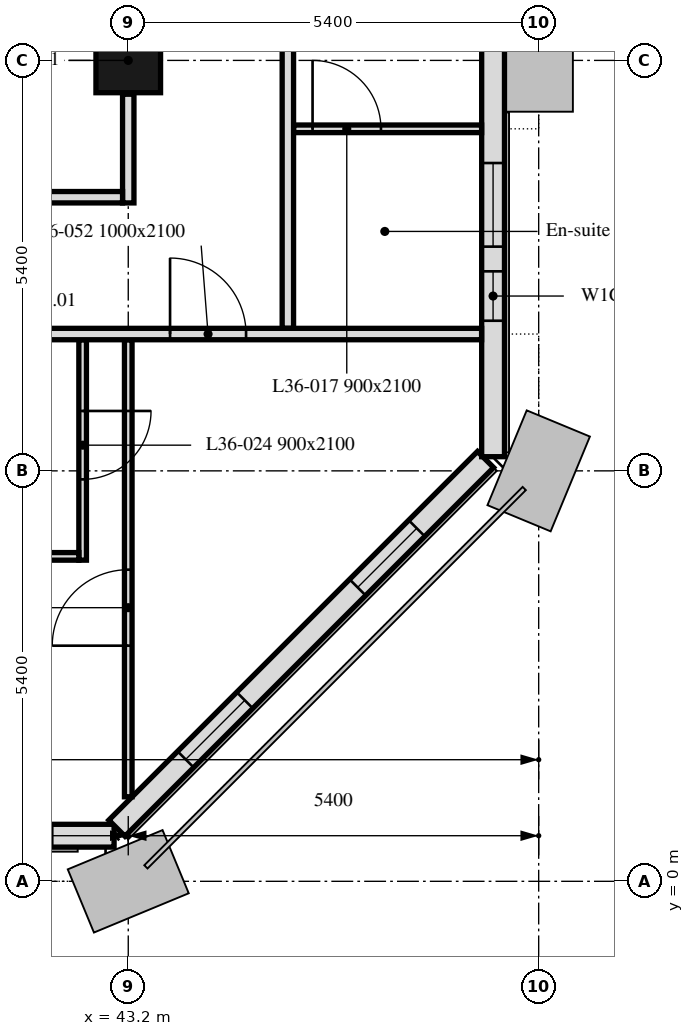
"""IFC4 building model, lengths in metres.
Left out: names, types, materials, properties, quantities, classifications, styles, units other than length and angle.
Written with IfcOpenShell. Run it as: python <this file> out.ifc"""

import sys

from ifc_helpers import new_model, si_unit, direction, frame, frame_2d, origin, origin_2d, place, context, subcontext, project, spatial, rectangle, extrude, element, fill, save


model = new_model("IFC4")
c1 = context("Model", 3, precision=1e-05, world=origin(), true_north=direction((0.0, 1.0)))
c2 = subcontext(c1, "Body", "Model", "MODEL_VIEW")
j1 = project(units=[si_unit("LENGTHUNIT", "METRE"), si_unit("PLANEANGLEUNIT", "RADIAN")], contexts=[c1])
p1 = place(None, origin())
s1 = spatial("IfcSite", under=j1, at=p1, CompositionType="ELEMENT")
p2 = place(p1, origin())
s2 = spatial("IfcBuilding", under=s1, at=p2, CompositionType="ELEMENT")
p3 = place(p2, frame((0.0, 0.0, 156.1)))
s3 = spatial("IfcBuildingStorey", under=s2, at=p3, CompositionType="ELEMENT", Elevation=156.1)
p4 = place(p3, frame((43.2, 10.8, 0.0), z_axis=(0.0, 0.0, 1.0), x_axis=(1.0, 0.0, 0.0)))
e1 = element("IfcColumn", 1, at=p4, inside=s3, PredefinedType="COLUMN", context=c2, shape_type="SweptSolid", body=[
    extrude(rectangle(XDim=0.85, YDim=0.85, at=origin_2d()), origin(), (0.0, 0.0, 1.0), 3.0),
])
p5 = place(p3, frame((10.986, 0.6, 0.0), z_axis=(0.0, 0.0, 1.0), x_axis=(1.0, 0.0, 0.0)))
e2 = element("IfcWall", 2, at=p5, inside=s3, PredefinedType="SOLIDWALL", context=c2, shape_type="SweptSolid", body=[
    extrude(rectangle(XDim=32.027, YDim=0.3, at=frame_2d((16.014, 0.0))), origin(), (0.0, 0.0, 1.0), 3.0),
])
p6 = place(p5, frame((2.764, 0.0, 0.9)))
e3 = element("IfcOpeningElement", 3, at=p6, cuts=e2, PredefinedType="OPENING", context=c2, shape_type="SweptSolid", body=[
    extrude(rectangle(XDim=1.1, YDim=1.7, at=frame_2d((0.55, 0.85))), frame((0.0, 0.16, 0.0), z_axis=(0.0, -1.0, 0.0), x_axis=(1.0, 0.0, 0.0)), (0.0, 0.0, 1.0), 0.32),
])
p7 = place(p5, frame((6.214, 0.0, 0.9)))
e4 = element("IfcOpeningElement", 4, at=p7, cuts=e2, PredefinedType="OPENING", context=c2, shape_type="SweptSolid", body=[
    extrude(rectangle(XDim=3.4, YDim=1.7, at=frame_2d((1.7, 0.85))), frame((0.0, 0.16, 0.0), z_axis=(0.0, -1.0, 0.0), x_axis=(1.0, 0.0, 0.0)), (0.0, 0.0, 1.0), 0.32),
])
p8 = place(p5, frame((13.564, 0.0, 0.9)))
e5 = element("IfcOpeningElement", 5, at=p8, cuts=e2, PredefinedType="OPENING", context=c2, shape_type="SweptSolid", body=[
    extrude(rectangle(XDim=1.1, YDim=1.7, at=frame_2d((0.55, 0.85))), frame((0.0, 0.16, 0.0), z_axis=(0.0, -1.0, 0.0), x_axis=(1.0, 0.0, 0.0)), (0.0, 0.0, 1.0), 0.32),
])
p9 = place(p5, frame((17.014, 0.0, 0.9)))
e6 = element("IfcOpeningElement", 6, at=p9, cuts=e2, PredefinedType="OPENING", context=c2, shape_type="SweptSolid", body=[
    extrude(rectangle(XDim=3.4, YDim=1.7, at=frame_2d((1.7, 0.85))), frame((0.0, 0.16, 0.0), z_axis=(0.0, -1.0, 0.0), x_axis=(1.0, 0.0, 0.0)), (0.0, 0.0, 1.0), 0.32),
])
p10 = place(p5, frame((24.364, 0.0, 0.9)))
e7 = element("IfcOpeningElement", 7, at=p10, cuts=e2, PredefinedType="OPENING", context=c2, shape_type="SweptSolid", body=[
    extrude(rectangle(XDim=1.1, YDim=1.7, at=frame_2d((0.55, 0.85))), frame((0.0, 0.16, 0.0), z_axis=(0.0, -1.0, 0.0), x_axis=(1.0, 0.0, 0.0)), (0.0, 0.0, 1.0), 0.32),
])
p11 = place(p5, frame((27.814, 0.0, 0.9)))
e8 = element("IfcOpeningElement", 8, at=p11, cuts=e2, PredefinedType="OPENING", context=c2, shape_type="SweptSolid", body=[
    extrude(rectangle(XDim=3.4, YDim=1.7, at=frame_2d((1.7, 0.85))), frame((0.0, 0.16, 0.0), z_axis=(0.0, -1.0, 0.0), x_axis=(1.0, 0.0, 0.0)), (0.0, 0.0, 1.0), 0.32),
])
p12 = place(p3, frame((43.051, 0.699, 0.0), z_axis=(0.0, 0.0, 1.0), x_axis=(0.707106781187, 0.707106781187, 0.0)))
e9 = element("IfcWall", 9, at=p12, inside=s3, PredefinedType="SOLIDWALL", context=c2, shape_type="SweptSolid", body=[
    extrude(rectangle(XDim=6.86, YDim=0.3, at=frame_2d((3.43, 0.0))), origin(), (0.0, 0.0, 1.0), 3.0),
])
p13 = place(p12, frame((1.28, 0.0, 0.9)))
e10 = element("IfcOpeningElement", 10, at=p13, cuts=e9, PredefinedType="OPENING", context=c2, shape_type="SweptSolid", body=[
    extrude(rectangle(XDim=1.1, YDim=1.7, at=frame_2d((0.55, 0.85))), frame((0.0, 0.16, 0.0), z_axis=(0.0, -1.0, 0.0), x_axis=(1.0, 0.0, 0.0)), (0.0, 0.0, 1.0), 0.32),
])
p14 = place(p12, frame((4.48, 0.0, 0.9)))
e11 = element("IfcOpeningElement", 11, at=p14, cuts=e9, PredefinedType="OPENING", context=c2, shape_type="SweptSolid", body=[
    extrude(rectangle(XDim=1.1, YDim=1.7, at=frame_2d((0.55, 0.85))), frame((0.0, 0.16, 0.0), z_axis=(0.0, -1.0, 0.0), x_axis=(1.0, 0.0, 0.0)), (0.0, 0.0, 1.0), 0.32),
])
p15 = place(p3, frame((48.0, 5.586, 0.0), z_axis=(0.0, 0.0, 1.0), x_axis=(0.0, 1.0, 0.0)))
e12 = element("IfcWall", 12, at=p15, inside=s3, PredefinedType="SOLIDWALL", context=c2, shape_type="SweptSolid", body=[
    extrude(rectangle(XDim=32.027, YDim=0.3, at=frame_2d((16.014, 0.0))), origin(), (0.0, 0.0, 1.0), 3.0),
])
p16 = place(p15, frame((1.789, 0.0, 0.9)))
e13 = element("IfcOpeningElement", 13, at=p16, cuts=e12, PredefinedType="OPENING", context=c2, shape_type="SweptSolid", body=[
    extrude(rectangle(XDim=0.65, YDim=1.7, at=frame_2d((0.325, 0.85))), frame((0.0, 0.16, 0.0), z_axis=(0.0, -1.0, 0.0), x_axis=(1.0, 0.0, 0.0)), (0.0, 0.0, 1.0), 0.32),
])
p17 = place(p15, frame((2.764, 0.0, 0.9)))
e14 = element("IfcOpeningElement", 14, at=p17, cuts=e12, PredefinedType="OPENING", context=c2, shape_type="SweptSolid", body=[
    extrude(rectangle(XDim=1.1, YDim=1.7, at=frame_2d((0.55, 0.85))), frame((0.0, 0.16, 0.0), z_axis=(0.0, -1.0, 0.0), x_axis=(1.0, 0.0, 0.0)), (0.0, 0.0, 1.0), 0.32),
])
p18 = place(p15, frame((6.214, 0.0, 0.9)))
e15 = element("IfcOpeningElement", 15, at=p18, cuts=e12, PredefinedType="OPENING", context=c2, shape_type="SweptSolid", body=[
    extrude(rectangle(XDim=3.4, YDim=1.7, at=frame_2d((1.7, 0.85))), frame((0.0, 0.16, 0.0), z_axis=(0.0, -1.0, 0.0), x_axis=(1.0, 0.0, 0.0)), (0.0, 0.0, 1.0), 0.32),
])
p19 = place(p15, frame((11.964, 0.0, 0.9)))
e16 = element("IfcOpeningElement", 16, at=p19, cuts=e12, PredefinedType="OPENING", context=c2, shape_type="SweptSolid", body=[
    extrude(rectangle(XDim=1.1, YDim=1.7, at=frame_2d((0.55, 0.85))), frame((0.0, 0.16, 0.0), z_axis=(0.0, -1.0, 0.0), x_axis=(1.0, 0.0, 0.0)), (0.0, 0.0, 1.0), 0.32),
])
p20 = place(p15, frame((13.564, 0.0, 0.9)))
e17 = element("IfcOpeningElement", 17, at=p20, cuts=e12, PredefinedType="OPENING", context=c2, shape_type="SweptSolid", body=[
    extrude(rectangle(XDim=1.1, YDim=1.7, at=frame_2d((0.55, 0.85))), frame((0.0, 0.16, 0.0), z_axis=(0.0, -1.0, 0.0), x_axis=(1.0, 0.0, 0.0)), (0.0, 0.0, 1.0), 0.32),
])
p21 = place(p15, frame((17.364, 0.0, 0.9)))
e18 = element("IfcOpeningElement", 18, at=p21, cuts=e12, PredefinedType="OPENING", context=c2, shape_type="SweptSolid", body=[
    extrude(rectangle(XDim=1.1, YDim=1.7, at=frame_2d((0.55, 0.85))), frame((0.0, 0.16, 0.0), z_axis=(0.0, -1.0, 0.0), x_axis=(1.0, 0.0, 0.0)), (0.0, 0.0, 1.0), 0.32),
])
p22 = place(p15, frame((18.964, 0.0, 0.9)))
e19 = element("IfcOpeningElement", 19, at=p22, cuts=e12, PredefinedType="OPENING", context=c2, shape_type="SweptSolid", body=[
    extrude(rectangle(XDim=1.1, YDim=1.7, at=frame_2d((0.55, 0.85))), frame((0.0, 0.16, 0.0), z_axis=(0.0, -1.0, 0.0), x_axis=(1.0, 0.0, 0.0)), (0.0, 0.0, 1.0), 0.32),
])
p23 = place(p15, frame((22.764, 0.0, 0.9)))
e20 = element("IfcOpeningElement", 20, at=p23, cuts=e12, PredefinedType="OPENING", context=c2, shape_type="SweptSolid", body=[
    extrude(rectangle(XDim=1.1, YDim=1.7, at=frame_2d((0.55, 0.85))), frame((0.0, 0.16, 0.0), z_axis=(0.0, -1.0, 0.0), x_axis=(1.0, 0.0, 0.0)), (0.0, 0.0, 1.0), 0.32),
])
p24 = place(p15, frame((24.364, 0.0, 0.9)))
e21 = element("IfcOpeningElement", 21, at=p24, cuts=e12, PredefinedType="OPENING", context=c2, shape_type="SweptSolid", body=[
    extrude(rectangle(XDim=1.1, YDim=1.7, at=frame_2d((0.55, 0.85))), frame((0.0, 0.16, 0.0), z_axis=(0.0, -1.0, 0.0), x_axis=(1.0, 0.0, 0.0)), (0.0, 0.0, 1.0), 0.32),
])
p25 = place(p15, frame((28.164, 0.0, 0.9)))
e22 = element("IfcOpeningElement", 22, at=p25, cuts=e12, PredefinedType="OPENING", context=c2, shape_type="SweptSolid", body=[
    extrude(rectangle(XDim=1.1, YDim=1.7, at=frame_2d((0.55, 0.85))), frame((0.0, 0.16, 0.0), z_axis=(0.0, -1.0, 0.0), x_axis=(1.0, 0.0, 0.0)), (0.0, 0.0, 1.0), 0.32),
])
p26 = place(p15, frame((29.764, 0.0, 0.9)))
e23 = element("IfcOpeningElement", 23, at=p26, cuts=e12, PredefinedType="OPENING", context=c2, shape_type="SweptSolid", body=[
    extrude(rectangle(XDim=1.1, YDim=1.7, at=frame_2d((0.55, 0.85))), frame((0.0, 0.16, 0.0), z_axis=(0.0, -1.0, 0.0), x_axis=(1.0, 0.0, 0.0)), (0.0, 0.0, 1.0), 0.32),
])
p27 = place(p3, frame((45.375, 9.9, 0.0), z_axis=(0.0, 0.0, 1.0), x_axis=(1.0, 0.0, 0.0)))
e24 = element("IfcWall", 24, at=p27, inside=s3, PredefinedType="PARTITIONING", context=c2, shape_type="SweptSolid", body=[
    extrude(rectangle(XDim=2.474, YDim=0.1, at=frame_2d((1.237, 0.0))), origin(), (0.0, 0.0, 1.0), 3.0),
])
p28 = place(p27, frame((0.25, 0.0, 0.0)))
e25 = element("IfcOpeningElement", 25, at=p28, cuts=e24, PredefinedType="OPENING", context=c2, shape_type="SweptSolid", body=[
    extrude(rectangle(XDim=0.9, YDim=2.1, at=frame_2d((0.45, 1.05))), frame((0.0, 0.05, 0.0), z_axis=(0.0, -1.0, 0.0), x_axis=(1.0, 0.0, 0.0)), (0.0, 0.0, 1.0), 0.1),
])
p29 = place(p3, frame((45.3, 21.525, 0.0), z_axis=(0.0, 0.0, 1.0), x_axis=(0.0, -1.0, 0.0)))
e26 = element("IfcWall", 26, at=p29, inside=s3, PredefinedType="PARTITIONING", context=c2, shape_type="SweptSolid", body=[
    extrude(rectangle(XDim=14.25, YDim=0.15, at=frame_2d((7.125, 0.0))), origin(), (0.0, 0.0, 1.0), 2.4),
])
p30 = place(p29, frame((2.125, 0.0, 0.0)))
e27 = element("IfcOpeningElement", 27, at=p30, cuts=e26, PredefinedType="OPENING", context=c2, shape_type="SweptSolid", body=[
    extrude(rectangle(XDim=1.0, YDim=2.1, at=frame_2d((0.5, 1.05))), frame((0.0, 0.075, 0.0), z_axis=(0.0, -1.0, 0.0), x_axis=(1.0, 0.0, 0.0)), (0.0, 0.0, 1.0), 0.15),
])
p31 = place(p29, frame((7.975, 0.0, 0.0)))
e28 = element("IfcOpeningElement", 28, at=p31, cuts=e26, PredefinedType="OPENING", context=c2, shape_type="SweptSolid", body=[
    extrude(rectangle(XDim=1.0, YDim=2.1, at=frame_2d((0.5, 1.05))), frame((0.0, 0.075, 0.0), z_axis=(0.0, -1.0, 0.0), x_axis=(1.0, 0.0, 0.0)), (0.0, 0.0, 1.0), 0.15),
])
p32 = place(p3, frame((43.2, 1.112, 0.0), z_axis=(0.0, 0.0, 1.0), x_axis=(0.0, 1.0, 0.0)))
e29 = element("IfcWall", 29, at=p32, inside=s3, PredefinedType="PARTITIONING", context=c2, shape_type="SweptSolid", body=[
    extrude(rectangle(XDim=6.013, YDim=0.1, at=frame_2d((3.006, 0.0))), origin(), (0.0, 0.0, 1.0), 3.0),
])
p33 = place(p32, frame((1.988, 0.0, 0.0)))
e30 = element("IfcOpeningElement", 30, at=p33, cuts=e29, PredefinedType="OPENING", context=c2, shape_type="SweptSolid", body=[
    extrude(rectangle(XDim=1.0, YDim=2.1, at=frame_2d((0.5, 1.05))), frame((0.0, 0.05, 0.0), z_axis=(0.0, -1.0, 0.0), x_axis=(1.0, 0.0, 0.0)), (0.0, 0.0, 1.0), 0.1),
])
p34 = place(p3, frame((42.6, 7.125, 0.0), z_axis=(0.0, 0.0, 1.0), x_axis=(0.0, -1.0, 0.0)))
e31 = element("IfcWall", 31, at=p34, inside=s3, PredefinedType="PARTITIONING", context=c2, shape_type="SweptSolid", body=[
    extrude(rectangle(XDim=2.9, YDim=0.1, at=frame_2d((1.45, 0.0))), origin(), (0.0, 0.0, 1.0), 3.0),
])
p35 = place(p34, frame((0.937, 0.0, 0.0)))
e32 = element("IfcOpeningElement", 32, at=p35, cuts=e31, PredefinedType="OPENING", context=c2, shape_type="SweptSolid", body=[
    extrude(rectangle(XDim=0.9, YDim=2.1, at=frame_2d((0.45, 1.05))), frame((0.0, 0.05, 0.0), z_axis=(0.0, -1.0, 0.0), x_axis=(1.0, 0.0, 0.0)), (0.0, 0.0, 1.0), 0.1),
])
p36 = place(p3, frame((42.55, 4.275, 0.0), z_axis=(0.0, 0.0, 1.0), x_axis=(-1.0, 0.0, 0.0)))
e33 = element("IfcWall", 33, at=p36, inside=s3, PredefinedType="PARTITIONING", context=c2, shape_type="SweptSolid", body=[
    extrude(rectangle(XDim=2.4, YDim=0.1, at=frame_2d((1.2, 0.0))), origin(), (0.0, 0.0, 1.0), 3.0),
])
p37 = place(p3, frame((6.151, 7.2, 0.0), z_axis=(0.0, 0.0, 1.0), x_axis=(1.0, 0.0, 0.0)))
e34 = element("IfcWall", 34, at=p37, inside=s3, PredefinedType="PARTITIONING", context=c2, shape_type="SweptSolid", body=[
    extrude(rectangle(XDim=41.698, YDim=0.15, at=frame_2d((20.849, 0.0))), origin(), (0.0, 0.0, 1.0), 2.4),
])
p38 = place(p37, frame((2.249, 0.0, 0.0)))
e35 = element("IfcOpeningElement", 35, at=p38, cuts=e34, PredefinedType="OPENING", context=c2, shape_type="SweptSolid", body=[
    extrude(rectangle(XDim=1.0, YDim=2.1, at=frame_2d((0.5, 1.05))), frame((0.0, 0.075, 0.0), z_axis=(0.0, -1.0, 0.0), x_axis=(1.0, 0.0, 0.0)), (0.0, 0.0, 1.0), 0.15),
])
p39 = place(p37, frame((7.649, 0.0, 0.0)))
e36 = element("IfcOpeningElement", 36, at=p39, cuts=e34, PredefinedType="OPENING", context=c2, shape_type="SweptSolid", body=[
    extrude(rectangle(XDim=1.0, YDim=2.1, at=frame_2d((0.5, 1.05))), frame((0.0, 0.075, 0.0), z_axis=(0.0, -1.0, 0.0), x_axis=(1.0, 0.0, 0.0)), (0.0, 0.0, 1.0), 0.15),
])
p40 = place(p37, frame((13.049, 0.0, 0.0)))
e37 = element("IfcOpeningElement", 37, at=p40, cuts=e34, PredefinedType="OPENING", context=c2, shape_type="SweptSolid", body=[
    extrude(rectangle(XDim=1.0, YDim=2.1, at=frame_2d((0.5, 1.05))), frame((0.0, 0.075, 0.0), z_axis=(0.0, -1.0, 0.0), x_axis=(1.0, 0.0, 0.0)), (0.0, 0.0, 1.0), 0.15),
])
p41 = place(p37, frame((18.449, 0.0, 0.0)))
e38 = element("IfcOpeningElement", 38, at=p41, cuts=e34, PredefinedType="OPENING", context=c2, shape_type="SweptSolid", body=[
    extrude(rectangle(XDim=1.0, YDim=2.1, at=frame_2d((0.5, 1.05))), frame((0.0, 0.075, 0.0), z_axis=(0.0, -1.0, 0.0), x_axis=(1.0, 0.0, 0.0)), (0.0, 0.0, 1.0), 0.15),
])
p42 = place(p37, frame((23.849, 0.0, 0.0)))
e39 = element("IfcOpeningElement", 39, at=p42, cuts=e34, PredefinedType="OPENING", context=c2, shape_type="SweptSolid", body=[
    extrude(rectangle(XDim=1.0, YDim=2.1, at=frame_2d((0.5, 1.05))), frame((0.0, 0.075, 0.0), z_axis=(0.0, -1.0, 0.0), x_axis=(1.0, 0.0, 0.0)), (0.0, 0.0, 1.0), 0.15),
])
p43 = place(p37, frame((29.249, 0.0, 0.0)))
e40 = element("IfcOpeningElement", 40, at=p43, cuts=e34, PredefinedType="OPENING", context=c2, shape_type="SweptSolid", body=[
    extrude(rectangle(XDim=1.0, YDim=2.1, at=frame_2d((0.5, 1.05))), frame((0.0, 0.075, 0.0), z_axis=(0.0, -1.0, 0.0), x_axis=(1.0, 0.0, 0.0)), (0.0, 0.0, 1.0), 0.15),
])
p44 = place(p37, frame((37.599, 0.0, 0.0)))
e41 = element("IfcOpeningElement", 41, at=p44, cuts=e34, PredefinedType="OPENING", context=c2, shape_type="SweptSolid", body=[
    extrude(rectangle(XDim=1.0, YDim=2.1, at=frame_2d((0.5, 1.05))), frame((0.0, 0.075, 0.0), z_axis=(0.0, -1.0, 0.0), x_axis=(1.0, 0.0, 0.0)), (0.0, 0.0, 1.0), 0.15),
])
p45 = place(p3, frame((43.2, 10.355, 0.0), z_axis=(0.0, 0.0, 1.0), x_axis=(0.0, -1.0, 0.0)))
e42 = element("IfcWall", 42, at=p45, inside=s3, PredefinedType="PARTITIONING", context=c2, shape_type="SweptSolid", body=[
    extrude(rectangle(XDim=1.43, YDim=0.15, at=frame_2d((0.715, 0.0))), origin(), (0.0, 0.0, 1.0), 3.0),
])
p46 = place(p3, frame((6.151, 9.0, 0.0), z_axis=(0.0, 0.0, 1.0), x_axis=(1.0, 0.0, 0.0)))
e43 = element("IfcWall", 43, at=p46, inside=s3, PredefinedType="PARTITIONING", context=c2, shape_type="SweptSolid", body=[
    extrude(rectangle(XDim=36.974, YDim=0.15, at=frame_2d((18.487, 0.0))), origin(), (0.0, 0.0, 1.0), 2.4),
])
p47 = place(p46, frame((1.214, 0.0, 0.0)))
e44 = element("IfcOpeningElement", 44, at=p47, cuts=e43, PredefinedType="OPENING", context=c2, shape_type="SweptSolid", body=[
    extrude(rectangle(XDim=1.0, YDim=2.1, at=frame_2d((0.5, 1.05))), frame((0.0, 0.075, 0.0), z_axis=(0.0, -1.0, 0.0), x_axis=(1.0, 0.0, 0.0)), (0.0, 0.0, 1.0), 0.15),
])
p48 = place(p46, frame((28.199, 0.0, 0.0)))
e45 = element("IfcOpeningElement", 45, at=p48, cuts=e43, PredefinedType="OPENING", context=c2, shape_type="SweptSolid", body=[
    extrude(rectangle(XDim=1.0, YDim=2.1, at=frame_2d((0.5, 1.05))), frame((0.0, 0.075, 0.0), z_axis=(0.0, -1.0, 0.0), x_axis=(1.0, 0.0, 0.0)), (0.0, 0.0, 1.0), 0.15),
])
p49 = place(p46, frame((7.099, 0.0, 0.0)))
e46 = element("IfcOpeningElement", 46, at=p49, cuts=e43, PredefinedType="OPENING", context=c2, shape_type="SweptSolid", body=[
    extrude(rectangle(XDim=1.0, YDim=2.1, at=frame_2d((0.5, 1.05))), frame((0.0, 0.075, 0.0), z_axis=(0.0, -1.0, 0.0), x_axis=(1.0, 0.0, 0.0)), (0.0, 0.0, 1.0), 0.15),
])
p50 = place(p46, frame((13.049, 0.0, 0.0)))
e47 = element("IfcOpeningElement", 47, at=p50, cuts=e43, PredefinedType="OPENING", context=c2, shape_type="SweptSolid", body=[
    extrude(rectangle(XDim=1.0, YDim=2.1, at=frame_2d((0.5, 1.05))), frame((0.0, 0.075, 0.0), z_axis=(0.0, -1.0, 0.0), x_axis=(1.0, 0.0, 0.0)), (0.0, 0.0, 1.0), 0.15),
])
p51 = place(p46, frame((16.849, 0.0, 0.0)))
e48 = element("IfcOpeningElement", 48, at=p51, cuts=e43, PredefinedType="OPENING", context=c2, shape_type="SweptSolid", body=[
    extrude(rectangle(XDim=1.0, YDim=2.1, at=frame_2d((0.5, 1.05))), frame((0.0, 0.075, 0.0), z_axis=(0.0, -1.0, 0.0), x_axis=(1.0, 0.0, 0.0)), (0.0, 0.0, 1.0), 0.15),
])
p52 = place(p46, frame((23.849, 0.0, 0.0)))
e49 = element("IfcOpeningElement", 49, at=p52, cuts=e43, PredefinedType="OPENING", context=c2, shape_type="SweptSolid", body=[
    extrude(rectangle(XDim=1.0, YDim=2.1, at=frame_2d((0.5, 1.05))), frame((0.0, 0.075, 0.0), z_axis=(0.0, -1.0, 0.0), x_axis=(1.0, 0.0, 0.0)), (0.0, 0.0, 1.0), 0.15),
])
p53 = place(p46, frame((4.829, 0.0, 0.0)))
e50 = element("IfcOpeningElement", 50, at=p53, cuts=e43, PredefinedType="OPENING", context=c2, shape_type="SweptSolid", body=[
    extrude(rectangle(XDim=1.8, YDim=2.4, at=frame_2d((0.9, 1.2))), frame((0.0, 0.075, 0.0), z_axis=(0.0, -1.0, 0.0), x_axis=(1.0, 0.0, 0.0)), (0.0, 0.0, 1.0), 0.15),
])
p54 = place(p46, frame((30.199, 0.0, 0.0)))
e51 = element("IfcOpeningElement", 51, at=p54, cuts=e43, PredefinedType="OPENING", context=c2, shape_type="SweptSolid", body=[
    extrude(rectangle(XDim=1.0, YDim=2.1, at=frame_2d((0.5, 1.05))), frame((0.0, 0.075, 0.0), z_axis=(0.0, -1.0, 0.0), x_axis=(1.0, 0.0, 0.0)), (0.0, 0.0, 1.0), 0.15),
])
p55 = place(p13, origin())
e52 = element("IfcWindow", 52, at=p55, inside=s3, PartitioningType="SINGLE_PANEL", PredefinedType="WINDOW", context=c2, shape_type="SweptSolid", body=[
    extrude(rectangle(XDim=1.1, YDim=1.7, at=frame_2d((0.55, 0.85))), frame((0.0, 0.03, 0.0), z_axis=(0.0, -1.0, 0.0), x_axis=(1.0, 0.0, 0.0)), (0.0, 0.0, 1.0), 0.06),
])
fill(e10, e52)
p56 = place(p14, origin())
e53 = element("IfcWindow", 53, at=p56, inside=s3, PartitioningType="SINGLE_PANEL", PredefinedType="WINDOW", context=c2, shape_type="SweptSolid", body=[
    extrude(rectangle(XDim=1.1, YDim=1.7, at=frame_2d((0.55, 0.85))), frame((0.0, 0.03, 0.0), z_axis=(0.0, -1.0, 0.0), x_axis=(1.0, 0.0, 0.0)), (0.0, 0.0, 1.0), 0.06),
])
fill(e11, e53)
p57 = place(p16, origin())
e54 = element("IfcWindow", 54, at=p57, inside=s3, PartitioningType="SINGLE_PANEL", PredefinedType="WINDOW", context=c2, shape_type="SweptSolid", body=[
    extrude(rectangle(XDim=0.65, YDim=1.7, at=frame_2d((0.325, 0.85))), frame((0.0, 0.03, 0.0), z_axis=(0.0, -1.0, 0.0), x_axis=(1.0, 0.0, 0.0)), (0.0, 0.0, 1.0), 0.06),
])
fill(e13, e54)
p58 = place(p17, origin())
e55 = element("IfcWindow", 55, at=p58, inside=s3, PartitioningType="SINGLE_PANEL", PredefinedType="WINDOW", context=c2, shape_type="SweptSolid", body=[
    extrude(rectangle(XDim=1.1, YDim=1.7, at=frame_2d((0.55, 0.85))), frame((0.0, 0.03, 0.0), z_axis=(0.0, -1.0, 0.0), x_axis=(1.0, 0.0, 0.0)), (0.0, 0.0, 1.0), 0.06),
])
fill(e14, e55)
p59 = place(p28, origin())
e56 = element("IfcDoor", 56, at=p59, inside=s3, OperationType="SINGLE_SWING_LEFT", PredefinedType="DOOR", context=c2, shape_type="SweptSolid", body=[
    extrude(rectangle(XDim=0.9, YDim=2.1, at=frame_2d((0.45, 1.05))), frame((0.0, 0.025, 0.0), z_axis=(0.0, -1.0, 0.0), x_axis=(1.0, 0.0, 0.0)), (0.0, 0.0, 1.0), 0.05),
])
fill(e25, e56)
p60 = place(p35, origin())
e57 = element("IfcDoor", 57, at=p60, inside=s3, OperationType="SINGLE_SWING_LEFT", PredefinedType="DOOR", context=c2, shape_type="SweptSolid", body=[
    extrude(rectangle(XDim=0.9, YDim=2.1, at=frame_2d((0.45, 1.05))), frame((0.0, 0.025, 0.0), z_axis=(0.0, -1.0, 0.0), x_axis=(1.0, 0.0, 0.0)), (0.0, 0.0, 1.0), 0.05),
])
fill(e32, e57)
p61 = place(p33, origin())
e58 = element("IfcDoor", 58, at=p61, inside=s3, OperationType="SINGLE_SWING_LEFT", PredefinedType="DOOR", context=c2, shape_type="SweptSolid", body=[
    extrude(rectangle(XDim=1.0, YDim=2.1, at=frame_2d((0.5, 1.05))), frame((0.0, 0.025, 0.0), z_axis=(0.0, -1.0, 0.0), x_axis=(1.0, 0.0, 0.0)), (0.0, 0.0, 1.0), 0.05),
])
fill(e30, e58)
p62 = place(p44, origin())
e59 = element("IfcDoor", 59, at=p62, inside=s3, OperationType="SINGLE_SWING_RIGHT", PredefinedType="DOOR", context=c2, shape_type="SweptSolid", body=[
    extrude(rectangle(XDim=1.0, YDim=2.1, at=frame_2d((0.5, 1.05))), frame((0.0, 0.025, 0.0), z_axis=(0.0, -1.0, 0.0), x_axis=(1.0, 0.0, 0.0)), (0.0, 0.0, 1.0), 0.05),
])
fill(e41, e59)
save(model, sys.argv[1])
